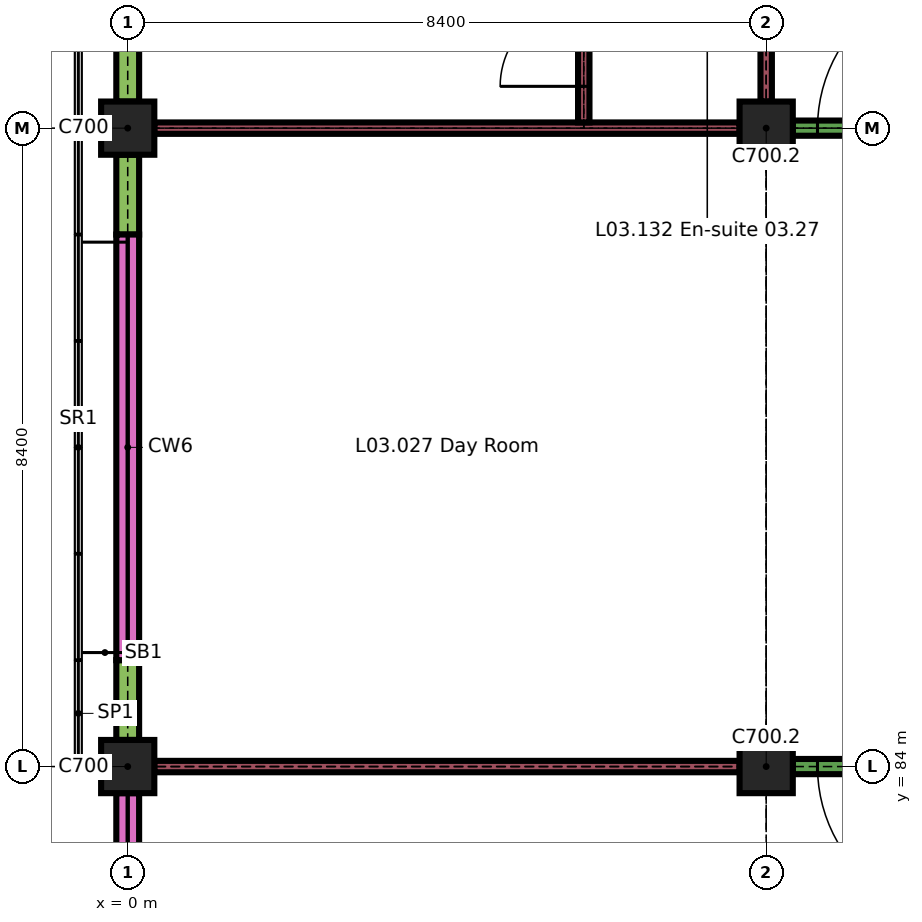
"""IFC4 building model, lengths in metres.
Left out: names, types, materials, properties, quantities, classifications, styles, units other than length and angle.
Written with IfcOpenShell. Run it as: python <this file> out.ifc"""

import sys

from ifc_helpers import new_model, si_unit, direction, frame, frame_2d, origin, origin_2d, place, context, subcontext, project, spatial, rectangle, extrude, element, fill, save


model = new_model("IFC4")
c1 = context("Model", 3, precision=1e-05, world=origin(), true_north=direction((0.0, 1.0)))
c2 = subcontext(c1, "Body", "Model", "MODEL_VIEW")
j1 = project(units=[si_unit("LENGTHUNIT", "METRE"), si_unit("PLANEANGLEUNIT", "RADIAN")], contexts=[c1])
p1 = place(None, origin())
s1 = spatial("IfcSite", under=j1, at=p1, CompositionType="ELEMENT")
p2 = place(p1, origin())
s2 = spatial("IfcBuilding", under=s1, at=p2, CompositionType="ELEMENT")
p3 = place(p2, frame((0.0, 0.0, 15.3)))
s3 = spatial("IfcBuildingStorey", under=s2, at=p3, CompositionType="ELEMENT", Elevation=15.3)
for number, where, z_axis, x_axis in (
    (1, (0.0, 84.0, 0.0), (0.0, 0.0, 1.0), (1.0, 0.0, 0.0)),
    (2, (8.4, 84.0, 0.0), (0.0, 0.0, 1.0), (1.0, 0.0, 0.0)),
    (3, (0.0, 92.4, 0.0), (0.0, 0.0, 1.0), (1.0, 0.0, 0.0)),
    (4, (8.4, 92.4, 0.0), (0.0, 0.0, 1.0), (1.0, 0.0, 0.0)),
):
    element("IfcColumn", number, at=place(p3, frame(where, z_axis=z_axis, x_axis=x_axis)), inside=s3, PredefinedType="COLUMN", context=c2, shape_type="SweptSolid", body=[
        extrude(rectangle(XDim=0.7, YDim=0.7, at=origin_2d()), origin(), (0.0, 0.0, 1.0), 3.26),
    ])
p4 = place(p3, frame((0.0, 79.8, 0.0), z_axis=(0.0, 0.0, 1.0), x_axis=(0.0, 1.0, 0.0)))
e5 = element("IfcWall", 5, at=p4, inside=s3, PredefinedType="SOLIDWALL", context=c2, shape_type="SweptSolid", body=[
    extrude(rectangle(XDim=3.85, YDim=0.3, at=frame_2d((1.925, 0.0))), origin(), (0.0, 0.0, 1.0), 0.6),
])
p5 = place(p3, frame((0.0, 84.35, 0.0), z_axis=(0.0, 0.0, 1.0), x_axis=(0.0, 1.0, 0.0)))
e6 = element("IfcWall", 6, at=p5, inside=s3, PredefinedType="SOLIDWALL", context=c2, shape_type="SweptSolid", body=[
    extrude(rectangle(XDim=1.05, YDim=0.3, at=frame_2d((0.525, 0.0))), origin(), (0.0, 0.0, 1.0), 2.96),
])
p6 = place(p3, frame((0.0, 91.0, 0.0), z_axis=(0.0, 0.0, 1.0), x_axis=(0.0, 1.0, 0.0)))
e7 = element("IfcWall", 7, at=p6, inside=s3, PredefinedType="SOLIDWALL", context=c2, shape_type="SweptSolid", body=[
    extrude(rectangle(XDim=1.05, YDim=0.3, at=frame_2d((0.525, 0.0))), origin(), (0.0, 0.0, 1.0), 2.96),
])
p7 = place(p3, frame((0.0, 85.4, 0.0), z_axis=(0.0, 0.0, 1.0), x_axis=(0.0, 1.0, 0.0)))
e8 = element("IfcWall", 8, at=p7, inside=s3, PredefinedType="SOLIDWALL", context=c2, shape_type="SweptSolid", body=[
    extrude(rectangle(XDim=5.6, YDim=0.3, at=frame_2d((2.8, 0.0))), origin(), (0.0, 0.0, 1.0), 0.6),
])
p8 = place(p3, frame((0.0, 92.75, 0.0), z_axis=(0.0, 0.0, 1.0), x_axis=(0.0, 1.0, 0.0)))
e9 = element("IfcWall", 9, at=p8, inside=s3, PredefinedType="SOLIDWALL", context=c2, shape_type="SweptSolid", body=[
    extrude(rectangle(XDim=3.85, YDim=0.3, at=frame_2d((1.925, 0.0))), origin(), (0.0, 0.0, 1.0), 2.96),
])
p9 = place(p8, frame((0.7, 0.0, 0.9)))
e10 = element("IfcOpeningElement", 10, at=p9, cuts=e9, PredefinedType="OPENING", context=c2, shape_type="SweptSolid", body=[
    extrude(rectangle(XDim=2.1, YDim=1.5, at=frame_2d((1.05, 0.75))), frame((0.0, 0.16, 0.0), z_axis=(0.0, -1.0, 0.0), x_axis=(1.0, 0.0, 0.0)), (0.0, 0.0, 1.0), 0.32),
])
p10 = place(p3, frame((0.35, 84.0, 0.0), z_axis=(0.0, 0.0, 1.0), x_axis=(1.0, 0.0, 0.0)))
e11 = element("IfcWall", 11, at=p10, inside=s3, PredefinedType="PARTITIONING", context=c2, shape_type="SweptSolid", body=[
    extrude(rectangle(XDim=7.7, YDim=0.15, at=frame_2d((3.85, 0.0))), origin(), (0.0, 0.0, 1.0), 3.26),
])
p11 = place(p3, frame((8.75, 84.0, 0.0), z_axis=(0.0, 0.0, 1.0), x_axis=(1.0, 0.0, 0.0)))
e12 = element("IfcWall", 12, at=p11, inside=s3, PredefinedType="PARTITIONING", context=c2, shape_type="SweptSolid", body=[
    extrude(rectangle(XDim=12.85, YDim=0.2, at=frame_2d((6.425, 0.0))), origin(), (0.0, 0.0, 1.0), 3.26),
])
p12 = place(p11, frame((0.325, 0.0, 0.0)))
e13 = element("IfcOpeningElement", 13, at=p12, cuts=e12, PredefinedType="OPENING", context=c2, shape_type="SweptSolid", body=[
    extrude(rectangle(XDim=2.0, YDim=2.4, at=frame_2d((1.0, 1.2))), frame((0.0, 0.11, 0.0), z_axis=(0.0, -1.0, 0.0), x_axis=(1.0, 0.0, 0.0)), (0.0, 0.0, 1.0), 0.22),
])
p13 = place(p11, frame((5.55, 0.0, 0.0)))
e14 = element("IfcOpeningElement", 14, at=p13, cuts=e12, PredefinedType="OPENING", context=c2, shape_type="SweptSolid", body=[
    extrude(rectangle(XDim=2.0, YDim=2.4, at=frame_2d((1.0, 1.2))), frame((0.0, 0.11, 0.0), z_axis=(0.0, -1.0, 0.0), x_axis=(1.0, 0.0, 0.0)), (0.0, 0.0, 1.0), 0.22),
])
p14 = place(p3, frame((0.35, 92.4, 0.0), z_axis=(0.0, 0.0, 1.0), x_axis=(1.0, 0.0, 0.0)))
e15 = element("IfcWall", 15, at=p14, inside=s3, PredefinedType="PARTITIONING", context=c2, shape_type="SweptSolid", body=[
    extrude(rectangle(XDim=7.7, YDim=0.15, at=frame_2d((3.85, 0.0))), origin(), (0.0, 0.0, 1.0), 3.26),
])
p15 = place(p3, frame((8.75, 92.4, 0.0), z_axis=(0.0, 0.0, 1.0), x_axis=(1.0, 0.0, 0.0)))
e16 = element("IfcWall", 16, at=p15, inside=s3, PredefinedType="PARTITIONING", context=c2, shape_type="SweptSolid", body=[
    extrude(rectangle(XDim=7.7, YDim=0.2, at=frame_2d((3.85, 0.0))), origin(), (0.0, 0.0, 1.0), 3.26),
])
p16 = place(p15, frame((0.325, 0.0, 0.0)))
e17 = element("IfcOpeningElement", 17, at=p16, cuts=e16, PredefinedType="OPENING", context=c2, shape_type="SweptSolid", body=[
    extrude(rectangle(XDim=2.0, YDim=2.4, at=frame_2d((1.0, 1.2))), frame((0.0, 0.11, 0.0), z_axis=(0.0, -1.0, 0.0), x_axis=(1.0, 0.0, 0.0)), (0.0, 0.0, 1.0), 0.22),
])
p17 = place(p15, frame((5.375, 0.0, 0.0)))
e18 = element("IfcOpeningElement", 18, at=p17, cuts=e16, PredefinedType="OPENING", context=c2, shape_type="SweptSolid", body=[
    extrude(rectangle(XDim=2.0, YDim=2.4, at=frame_2d((1.0, 1.2))), frame((0.0, 0.11, 0.0), z_axis=(0.0, -1.0, 0.0), x_axis=(1.0, 0.0, 0.0)), (0.0, 0.0, 1.0), 0.22),
])
p18 = place(p3, frame((6.0, 92.475, 0.0), z_axis=(0.0, 0.0, 1.0), x_axis=(0.0, 1.0, 0.0)))
e19 = element("IfcWall", 19, at=p18, inside=s3, PredefinedType="PARTITIONING", context=c2, shape_type="SweptSolid", body=[
    extrude(rectangle(XDim=2.05, YDim=0.15, at=frame_2d((1.025, 0.0))), origin(), (0.0, 0.0, 1.0), 3.26),
])
p19 = place(p18, frame((0.475, 0.0, 0.0)))
e20 = element("IfcOpeningElement", 20, at=p19, cuts=e19, PredefinedType="OPENING", context=c2, shape_type="SweptSolid", body=[
    extrude(rectangle(XDim=1.1, YDim=2.1, at=frame_2d((0.55, 1.05))), frame((0.0, 0.085, 0.0), z_axis=(0.0, -1.0, 0.0), x_axis=(1.0, 0.0, 0.0)), (0.0, 0.0, 1.0), 0.17),
])
p20 = place(p3, frame((8.4, 92.75, 0.0), z_axis=(0.0, 0.0, 1.0), x_axis=(0.0, 1.0, 0.0)))
e21 = element("IfcWall", 21, at=p20, inside=s3, PredefinedType="PARTITIONING", context=c2, shape_type="SweptSolid", body=[
    extrude(rectangle(XDim=7.7, YDim=0.15, at=frame_2d((3.85, 0.0))), origin(), (0.0, 0.0, 1.0), 3.26),
])
p21 = place(p20, frame((2.1, 0.0, 0.0)))
e22 = element("IfcOpeningElement", 22, at=p21, cuts=e21, PredefinedType="OPENING", context=c2, shape_type="SweptSolid", body=[
    extrude(rectangle(XDim=1.5, YDim=2.4, at=frame_2d((0.75, 1.2))), frame((0.0, 0.085, 0.0), z_axis=(0.0, -1.0, 0.0), x_axis=(1.0, 0.0, 0.0)), (0.0, 0.0, 1.0), 0.17),
])
p22 = place(p20, frame((4.1, 0.0, 0.0)))
e23 = element("IfcOpeningElement", 23, at=p22, cuts=e21, PredefinedType="OPENING", context=c2, shape_type="SweptSolid", body=[
    extrude(rectangle(XDim=1.5, YDim=2.4, at=frame_2d((0.75, 1.2))), frame((0.0, 0.085, 0.0), z_axis=(0.0, -1.0, 0.0), x_axis=(1.0, 0.0, 0.0)), (0.0, 0.0, 1.0), 0.17),
])
p23 = place(p12, origin())
e24 = element("IfcDoor", 24, at=p23, inside=s3, OperationType="SINGLE_SWING_RIGHT", PredefinedType="DOOR", context=c2, shape_type="SweptSolid", body=[
    extrude(rectangle(XDim=2.0, YDim=2.4, at=frame_2d((1.0, 1.2))), frame((0.0, 0.03, 0.0), z_axis=(0.0, -1.0, 0.0), x_axis=(1.0, 0.0, 0.0)), (0.0, 0.0, 1.0), 0.06),
])
fill(e13, e24)
p24 = place(p16, origin())
e25 = element("IfcDoor", 25, at=p24, inside=s3, OperationType="SINGLE_SWING_LEFT", PredefinedType="DOOR", context=c2, shape_type="SweptSolid", body=[
    extrude(rectangle(XDim=2.0, YDim=2.4, at=frame_2d((1.0, 1.2))), frame((0.0, 0.03, 0.0), z_axis=(0.0, -1.0, 0.0), x_axis=(1.0, 0.0, 0.0)), (0.0, 0.0, 1.0), 0.06),
])
fill(e17, e25)
p25 = place(p19, origin())
e26 = element("IfcDoor", 26, at=p25, inside=s3, OperationType="SINGLE_SWING_RIGHT", PredefinedType="DOOR", context=c2, shape_type="SweptSolid", body=[
    extrude(rectangle(XDim=1.1, YDim=2.1, at=frame_2d((0.55, 1.05))), frame((0.0, 0.025, 0.0), z_axis=(0.0, -1.0, 0.0), x_axis=(1.0, 0.0, 0.0)), (0.0, 0.0, 1.0), 0.05),
])
fill(e20, e26)
save(model, sys.argv[1])
